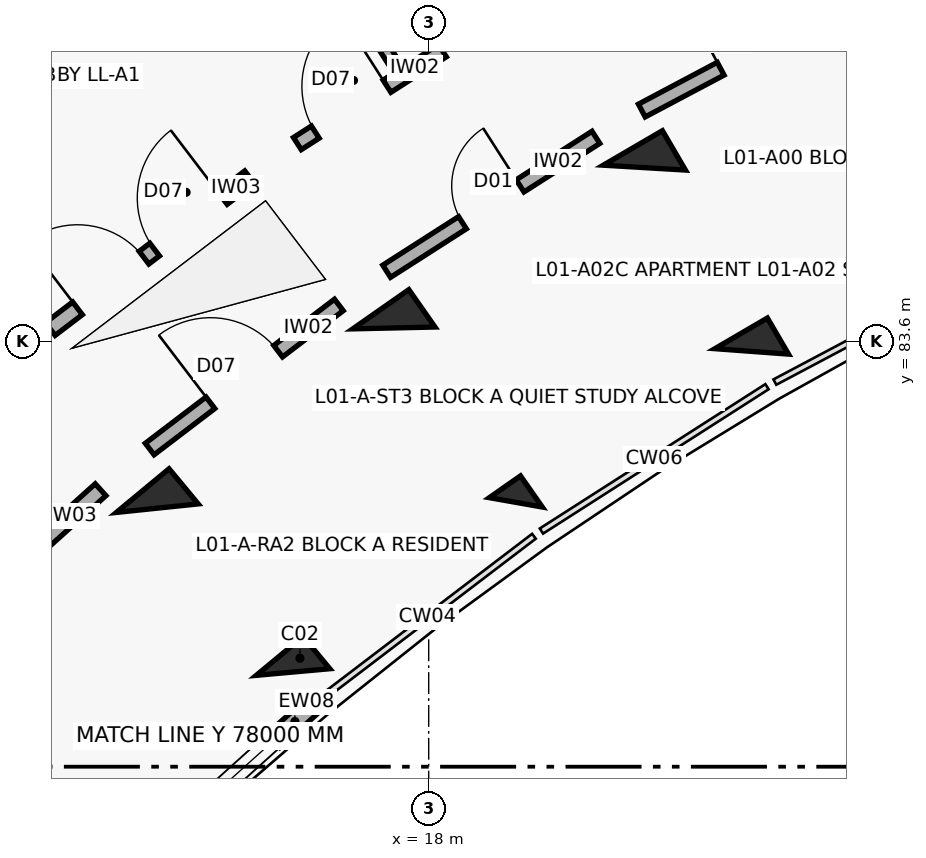
"""IFC4 building model, lengths in metres.
Left out: names, types, materials, properties, quantities, classifications, styles, units other than length and angle.
Written with IfcOpenShell. Run it as: python <this file> out.ifc"""

import sys

from ifc_helpers import new_model, si_unit, direction, frame, frame_2d, origin, origin_2d, place, context, subcontext, project, spatial, rectangle, extrude, element, fill, save


model = new_model("IFC4")
c1 = context("Model", 3, precision=1e-05, world=origin(), true_north=direction((0.0, 1.0)))
c2 = subcontext(c1, "Body", "Model", "MODEL_VIEW")
j1 = project(units=[si_unit("LENGTHUNIT", "METRE"), si_unit("PLANEANGLEUNIT", "RADIAN")], contexts=[c1])
p1 = place(None, origin())
s1 = spatial("IfcSite", under=j1, at=p1, CompositionType="ELEMENT")
p2 = place(p1, origin())
s2 = spatial("IfcBuilding", under=s1, at=p2, CompositionType="ELEMENT")
p3 = place(p2, frame((0.0, 0.0, 4.5)))
s3 = spatial("IfcBuildingStorey", under=s2, at=p3, CompositionType="ELEMENT", Elevation=4.5)
p4 = place(p3, frame((16.215, 79.245, 0.0), z_axis=(0.0, 0.0, 1.0), x_axis=(-0.637961754089, 0.770068049148, 0.0)))
e1 = element("IfcColumn", 1, at=p4, inside=s3, PredefinedType="COLUMN", context=c2, shape_type="SweptSolid", body=[
    extrude(rectangle(XDim=0.55, YDim=0.8, at=origin_2d()), origin(), (0.0, 0.0, 1.0), 3.6),
])
p5 = place(p3, frame((14.429, 81.402, 0.0), z_axis=(0.0, 0.0, 1.0), x_axis=(-0.637961754089, 0.770068049148, 0.0)))
e2 = element("IfcColumn", 2, at=p5, inside=s3, PredefinedType="COLUMN", context=c2, shape_type="SweptSolid", body=[
    extrude(rectangle(XDim=0.6, YDim=0.9, at=origin_2d()), origin(), (0.0, 0.0, 1.0), 3.6),
])
p6 = place(p3, frame((19.146, 81.478, 0.0), z_axis=(0.0, 0.0, 1.0), x_axis=(-0.573004420611, 0.819552276527, 0.0)))
e3 = element("IfcColumn", 3, at=p6, inside=s3, PredefinedType="COLUMN", context=c2, shape_type="SweptSolid", body=[
    extrude(rectangle(XDim=0.5, YDim=0.5, at=origin_2d()), origin(), (0.0, 0.0, 1.0), 3.6),
])
p7 = place(p3, frame((17.542, 83.773, 0.0), z_axis=(0.0, 0.0, 1.0), x_axis=(-0.573004420611, 0.819552276527, 0.0)))
e4 = element("IfcColumn", 4, at=p7, inside=s3, PredefinedType="COLUMN", context=c2, shape_type="SweptSolid", body=[
    extrude(rectangle(XDim=0.6, YDim=0.9, at=origin_2d()), origin(), (0.0, 0.0, 1.0), 3.6),
])
p8 = place(p3, frame((22.249, 83.464, 0.0), z_axis=(0.0, 0.0, 1.0), x_axis=(-0.504226211181, 0.863571611366, 0.0)))
e5 = element("IfcColumn", 5, at=p8, inside=s3, PredefinedType="COLUMN", context=c2, shape_type="SweptSolid", body=[
    extrude(rectangle(XDim=0.55, YDim=0.8, at=origin_2d()), origin(), (0.0, 0.0, 1.0), 3.6),
])
p9 = place(p3, frame((20.837, 85.882, 0.0), z_axis=(0.0, 0.0, 1.0), x_axis=(-0.504226211181, 0.863571611366, 0.0)))
e6 = element("IfcColumn", 6, at=p9, inside=s3, PredefinedType="COLUMN", context=c2, shape_type="SweptSolid", body=[
    extrude(rectangle(XDim=0.6, YDim=0.9, at=origin_2d()), origin(), (0.0, 0.0, 1.0), 3.6),
])
p10 = place(p3, frame((13.84, 76.437, 0.0), z_axis=(0.0, 0.0, 1.0), x_axis=(0.743385092197, 0.668863666751, 0.0)))
e7 = element("IfcWall", 7, at=p10, inside=s3, PredefinedType="SOLIDWALL", context=c2, shape_type="SweptSolid", body=[
    extrude(rectangle(XDim=3.604, YDim=0.245, at=frame_2d((1.802, 0.0))), origin(), (0.0, 0.0, 1.0), 2.6),
])
p11 = place(p10, frame((0.752, 0.0, 0.32)))
e8 = element("IfcOpeningElement", 8, at=p11, cuts=e7, PredefinedType="OPENING", context=c2, shape_type="SweptSolid", body=[
    extrude(rectangle(XDim=2.1, YDim=1.65, at=frame_2d((1.05, 0.825))), frame((0.0, 0.133, 0.0), z_axis=(0.0, -1.0, 0.0), x_axis=(1.0, 0.0, 0.0)), (0.0, 0.0, 1.0), 0.265),
])
p12 = place(p3, frame((11.357, 79.552, 0.0), z_axis=(0.0, 0.0, 1.0), x_axis=(0.743387266925, 0.668861249718, 0.0)))
e9 = element("IfcWall", 9, at=p12, inside=s3, PredefinedType="SOLIDWALL", context=c2, shape_type="SweptSolid", body=[
    extrude(rectangle(XDim=3.128, YDim=0.21, at=frame_2d((1.564, 0.0))), origin(), (0.0, 0.0, 1.0), 2.58),
])
p13 = place(p12, frame((1.014, 0.0, 0.0)))
e10 = element("IfcOpeningElement", 10, at=p13, cuts=e9, PredefinedType="OPENING", context=c2, shape_type="SweptSolid", body=[
    extrude(rectangle(XDim=1.1, YDim=2.15, at=frame_2d((0.55, 1.075))), frame((0.0, 0.115, 0.0), z_axis=(0.0, -1.0, 0.0), x_axis=(1.0, 0.0, 0.0)), (0.0, 0.0, 1.0), 0.23),
])
p14 = place(p3, frame((13.021, 83.759, 0.0), z_axis=(0.0, 0.0, 1.0), x_axis=(0.795498026433, 0.605956178235, 0.0)))
e11 = element("IfcWall", 11, at=p14, inside=s3, PredefinedType="SOLIDWALL", context=c2, shape_type="SweptSolid", body=[
    extrude(rectangle(XDim=3.296, YDim=0.21, at=frame_2d((1.648, 0.0))), origin(), (0.0, 0.0, 1.0), 2.58),
])
p15 = place(p14, frame((0.45, 0.0, 0.0)))
e12 = element("IfcOpeningElement", 12, at=p15, cuts=e11, PredefinedType="OPENING", context=c2, shape_type="SweptSolid", body=[
    extrude(rectangle(XDim=1.1, YDim=2.15, at=frame_2d((0.55, 1.075))), frame((0.0, 0.115, 0.0), z_axis=(0.0, -1.0, 0.0), x_axis=(1.0, 0.0, 0.0)), (0.0, 0.0, 1.0), 0.23),
])
p16 = place(p14, frame((1.726, 0.0, 0.0)))
e13 = element("IfcOpeningElement", 13, at=p16, cuts=e11, PredefinedType="OPENING", context=c2, shape_type="SweptSolid", body=[
    extrude(rectangle(XDim=1.12, YDim=2.15, at=frame_2d((0.56, 1.075))), frame((0.0, 0.115, 0.0), z_axis=(0.0, -1.0, 0.0), x_axis=(1.0, 0.0, 0.0)), (0.0, 0.0, 1.0), 0.23),
])
p17 = place(p3, frame((14.329, 82.18, 0.0), z_axis=(0.0, 0.0, 1.0), x_axis=(0.795501577908, 0.605951515838, 0.0)))
e14 = element("IfcWall", 14, at=p17, inside=s3, PredefinedType="SOLIDWALL", context=c2, shape_type="SweptSolid", body=[
    extrude(rectangle(XDim=3.129, YDim=0.19, at=frame_2d((1.564, 0.0))), origin(), (0.0, 0.0, 1.0), 2.58),
])
p18 = place(p17, frame((1.004, 0.0, 0.0)))
e15 = element("IfcOpeningElement", 15, at=p18, cuts=e14, PredefinedType="OPENING", context=c2, shape_type="SweptSolid", body=[
    extrude(rectangle(XDim=1.12, YDim=2.15, at=frame_2d((0.56, 1.075))), frame((0.0, 0.105, 0.0), z_axis=(0.0, -1.0, 0.0), x_axis=(1.0, 0.0, 0.0)), (0.0, 0.0, 1.0), 0.21),
])
p19 = place(p3, frame((16.272, 86.199, 0.0), z_axis=(0.0, 0.0, 1.0), x_axis=(0.842257205985, 0.539075874963, 0.0)))
e16 = element("IfcWall", 16, at=p19, inside=s3, PredefinedType="SOLIDWALL", context=c2, shape_type="SweptSolid", body=[
    extrude(rectangle(XDim=3.436, YDim=0.19, at=frame_2d((1.718, 0.0))), origin(), (0.0, 0.0, 1.0), 2.58),
])
p20 = place(p19, frame((0.28, 0.0, 0.0)))
e17 = element("IfcOpeningElement", 17, at=p20, cuts=e16, PredefinedType="OPENING", context=c2, shape_type="SweptSolid", body=[
    extrude(rectangle(XDim=1.12, YDim=2.15, at=frame_2d((0.56, 1.075))), frame((0.0, 0.105, 0.0), z_axis=(0.0, -1.0, 0.0), x_axis=(1.0, 0.0, 0.0)), (0.0, 0.0, 1.0), 0.21),
])
p21 = place(p19, frame((2.266, 0.0, 0.0)))
e18 = element("IfcOpeningElement", 18, at=p21, cuts=e16, PredefinedType="OPENING", context=c2, shape_type="SweptSolid", body=[
    extrude(rectangle(XDim=0.95, YDim=2.1, at=frame_2d((0.475, 1.05))), frame((0.0, 0.105, 0.0), z_axis=(0.0, -1.0, 0.0), x_axis=(1.0, 0.0, 0.0)), (0.0, 0.0, 1.0), 0.21),
])
p22 = place(p3, frame((17.447, 84.519, 0.0), z_axis=(0.0, 0.0, 1.0), x_axis=(0.842225276846, 0.539125758095, 0.0)))
e19 = element("IfcWall", 19, at=p22, inside=s3, PredefinedType="SOLIDWALL", context=c2, shape_type="SweptSolid", body=[
    extrude(rectangle(XDim=3.269, YDim=0.19, at=frame_2d((1.634, 0.0))), origin(), (0.0, 0.0, 1.0), 2.58),
])
p23 = place(p22, frame((1.184, 0.0, 0.0)))
e20 = element("IfcOpeningElement", 20, at=p23, cuts=e19, PredefinedType="OPENING", context=c2, shape_type="SweptSolid", body=[
    extrude(rectangle(XDim=0.9, YDim=2.1, at=frame_2d((0.45, 1.05))), frame((0.0, 0.105, 0.0), z_axis=(0.0, -1.0, 0.0), x_axis=(1.0, 0.0, 0.0)), (0.0, 0.0, 1.0), 0.21),
])
p24 = place(p3, frame((17.524, 87.288, 0.0), z_axis=(0.0, 0.0, 1.0), x_axis=(-0.540338452216, 0.841447774408, 0.0)))
e21 = element("IfcWall", 21, at=p24, inside=s3, PredefinedType="PARTITIONING", context=c2, shape_type="SweptSolid", body=[
    extrude(rectangle(XDim=7.95, YDim=0.14, at=frame_2d((3.975, 0.0))), origin(), (0.0, 0.0, 1.0), 2.58),
])
p25 = place(p24, frame((6.05, 0.0, 0.0)))
e22 = element("IfcOpeningElement", 22, at=p25, cuts=e21, PredefinedType="OPENING", context=c2, shape_type="SweptSolid", body=[
    extrude(rectangle(XDim=0.92, YDim=2.1, at=frame_2d((0.46, 1.05))), frame((0.0, 0.08, 0.0), z_axis=(0.0, -1.0, 0.0), x_axis=(1.0, 0.0, 0.0)), (0.0, 0.0, 1.0), 0.16),
])
p26 = place(p3, frame((20.804, 86.634, 0.0), z_axis=(0.0, 0.0, 1.0), x_axis=(0.883444301944, 0.468536194293, 0.0)))
e23 = element("IfcWall", 23, at=p26, inside=s3, PredefinedType="SOLIDWALL", context=c2, shape_type="SweptSolid", body=[
    extrude(rectangle(XDim=3.269, YDim=0.19, at=frame_2d((1.634, 0.0))), origin(), (0.0, 0.0, 1.0), 2.58),
])
p27 = place(p26, frame((1.174, 0.0, 0.0)))
e24 = element("IfcOpeningElement", 24, at=p27, cuts=e23, PredefinedType="OPENING", context=c2, shape_type="SweptSolid", body=[
    extrude(rectangle(XDim=0.92, YDim=2.1, at=frame_2d((0.46, 1.05))), frame((0.0, 0.105, 0.0), z_axis=(0.0, -1.0, 0.0), x_axis=(1.0, 0.0, 0.0)), (0.0, 0.0, 1.0), 0.21),
])
p28 = place(p11, origin())
e25 = element("IfcWindow", 25, at=p28, inside=s3, PartitioningType="TRIPLE_PANEL_VERTICAL", PredefinedType="WINDOW", context=c2, shape_type="SweptSolid", body=[
    extrude(rectangle(XDim=2.1, YDim=1.65, at=frame_2d((1.05, 0.825))), frame((0.0, 0.03, 0.0), z_axis=(0.0, -1.0, 0.0), x_axis=(1.0, 0.0, 0.0)), (0.0, 0.0, 1.0), 0.06),
])
fill(e8, e25)
p29 = place(p15, origin())
e26 = element("IfcDoor", 26, at=p29, inside=s3, OperationType="SINGLE_SWING_LEFT", PredefinedType="DOOR", context=c2, shape_type="SweptSolid", body=[
    extrude(rectangle(XDim=1.1, YDim=2.15, at=frame_2d((0.55, 1.075))), frame((0.0, 0.025, 0.0), z_axis=(0.0, -1.0, 0.0), x_axis=(1.0, 0.0, 0.0)), (0.0, 0.0, 1.0), 0.05),
])
fill(e12, e26)
p30 = place(p16, origin())
e27 = element("IfcDoor", 27, at=p30, inside=s3, OperationType="SINGLE_SWING_RIGHT", PredefinedType="DOOR", context=c2, shape_type="SweptSolid", body=[
    extrude(rectangle(XDim=1.12, YDim=2.15, at=frame_2d((0.56, 1.075))), frame((0.0, 0.025, 0.0), z_axis=(0.0, -1.0, 0.0), x_axis=(1.0, 0.0, 0.0)), (0.0, 0.0, 1.0), 0.05),
])
fill(e13, e27)
p31 = place(p18, origin())
e28 = element("IfcDoor", 28, at=p31, inside=s3, OperationType="SINGLE_SWING_LEFT", PredefinedType="DOOR", context=c2, shape_type="SweptSolid", body=[
    extrude(rectangle(XDim=1.12, YDim=2.15, at=frame_2d((0.56, 1.075))), frame((0.0, 0.025, 0.0), z_axis=(0.0, -1.0, 0.0), x_axis=(1.0, 0.0, 0.0)), (0.0, 0.0, 1.0), 0.05),
])
fill(e15, e28)
p32 = place(p20, origin())
e29 = element("IfcDoor", 29, at=p32, inside=s3, OperationType="SINGLE_SWING_RIGHT", PredefinedType="DOOR", context=c2, shape_type="SweptSolid", body=[
    extrude(rectangle(XDim=1.12, YDim=2.15, at=frame_2d((0.56, 1.075))), frame((0.0, 0.025, 0.0), z_axis=(0.0, -1.0, 0.0), x_axis=(1.0, 0.0, 0.0)), (0.0, 0.0, 1.0), 0.05),
])
fill(e17, e29)
p33 = place(p21, origin())
e30 = element("IfcDoor", 30, at=p33, inside=s3, OperationType="SINGLE_SWING_LEFT", PredefinedType="DOOR", context=c2, shape_type="SweptSolid", body=[
    extrude(rectangle(XDim=0.95, YDim=2.1, at=frame_2d((0.475, 1.05))), frame((0.0, 0.025, 0.0), z_axis=(0.0, -1.0, 0.0), x_axis=(1.0, 0.0, 0.0)), (0.0, 0.0, 1.0), 0.05),
])
fill(e18, e30)
p34 = place(p23, origin())
e31 = element("IfcDoor", 31, at=p34, inside=s3, OperationType="SINGLE_SWING_RIGHT", PredefinedType="DOOR", context=c2, shape_type="SweptSolid", body=[
    extrude(rectangle(XDim=0.9, YDim=2.1, at=frame_2d((0.45, 1.05))), frame((0.0, 0.025, 0.0), z_axis=(0.0, -1.0, 0.0), x_axis=(1.0, 0.0, 0.0)), (0.0, 0.0, 1.0), 0.05),
])
fill(e20, e31)
p35 = place(p27, origin())
e32 = element("IfcDoor", 32, at=p35, inside=s3, OperationType="SINGLE_SWING_LEFT", PredefinedType="DOOR", context=c2, shape_type="SweptSolid", body=[
    extrude(rectangle(XDim=0.92, YDim=2.1, at=frame_2d((0.46, 1.05))), frame((0.0, 0.025, 0.0), z_axis=(0.0, -1.0, 0.0), x_axis=(1.0, 0.0, 0.0)), (0.0, 0.0, 1.0), 0.05),
])
fill(e24, e32)
save(model, sys.argv[1])
